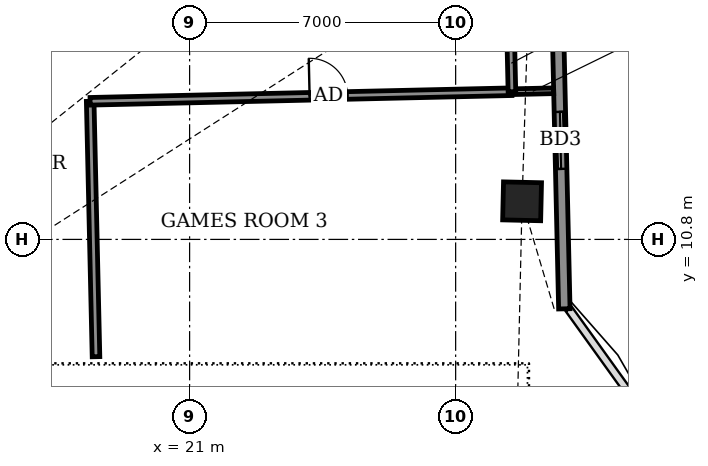
"""IFC4 building model, lengths in metres.
Left out: names, types, materials, properties, quantities, classifications, styles, units other than length and angle.
Written with IfcOpenShell. Run it as: python <this file> out.ifc"""

import sys

from ifc_helpers import new_model, si_unit, direction, frame, frame_2d, origin, origin_2d, place, context, subcontext, project, spatial, rectangle, extrude, element, fill, save


model = new_model("IFC4")
c1 = context("Model", 3, precision=1e-05, world=origin(), true_north=direction((0.0, 1.0)))
c2 = subcontext(c1, "Body", "Model", "MODEL_VIEW")
j1 = project(units=[si_unit("LENGTHUNIT", "METRE"), si_unit("PLANEANGLEUNIT", "RADIAN")], contexts=[c1])
p1 = place(None, origin())
s1 = spatial("IfcSite", under=j1, at=p1, CompositionType="ELEMENT")
p2 = place(p1, origin())
s2 = spatial("IfcBuilding", under=s1, at=p2, CompositionType="ELEMENT")
p3 = place(p2, frame((0.0, 0.0, 275.3)))
s3 = spatial("IfcBuildingStorey", under=s2, at=p3, CompositionType="ELEMENT", Elevation=275.3)
p4 = place(p3, frame((29.748, 11.802, -0.55), z_axis=(0.0, 0.0, 1.0), x_axis=(0.0226694311, 0.999743015426, 0.0)))
e1 = element("IfcColumn", 1, at=p4, inside=s3, PredefinedType="COLUMN", context=c2, shape_type="SweptSolid", body=[
    extrude(rectangle(XDim=1.0, YDim=1.0, at=origin_2d()), origin(), (0.0, 0.0, 1.0), 4.6),
])
p5 = place(p3, frame((30.86, 8.973, 0.0), z_axis=(0.0, 0.0, 1.0), x_axis=(-0.022743742485, 0.999741327633, 0.0)))
e2 = element("IfcWall", 2, at=p5, inside=s3, PredefinedType="SOLIDWALL", context=c2, shape_type="SweptSolid", body=[
    extrude(rectangle(XDim=15.393, YDim=0.3, at=frame_2d((7.697, 0.0))), origin(), (0.0, 0.0, 1.0), 2.35),
])
p6 = place(p5, frame((3.684, 0.0, 0.0)))
e3 = element("IfcOpeningElement", 3, at=p6, cuts=e2, PredefinedType="OPENING", context=c2, shape_type="SweptSolid", body=[
    extrude(rectangle(XDim=1.5, YDim=2.0, at=frame_2d((0.75, 1.0))), frame((0.0, 0.16, 0.0), z_axis=(0.0, -1.0, 0.0), x_axis=(1.0, 0.0, 0.0)), (0.0, 0.0, 1.0), 0.32),
])
p7 = place(p5, frame((12.313, 0.0, 0.5)))
e4 = element("IfcOpeningElement", 4, at=p7, cuts=e2, PredefinedType="OPENING", context=c2, shape_type="SweptSolid", body=[
    extrude(rectangle(XDim=1.2, YDim=1.1, at=frame_2d((0.6, 0.55))), frame((0.0, 0.16, 0.0), z_axis=(0.0, -1.0, 0.0), x_axis=(1.0, 0.0, 0.0)), (0.0, 0.0, 1.0), 0.32),
])
p8 = place(p3, frame((18.537, 7.714, 0.0), z_axis=(0.0, 0.0, 1.0), x_axis=(-0.022773383809, 0.999740652864, 0.0)))
e5 = element("IfcWall", 5, at=p8, inside=s3, PredefinedType="PARTITIONING", context=c2, shape_type="SweptSolid", body=[
    extrude(rectangle(XDim=6.722, YDim=0.2, at=frame_2d((3.361, 0.0))), origin(), (0.0, 0.0, 1.0), 2.35),
])
p9 = place(p3, frame((18.382, 14.434, 0.0), z_axis=(0.0, 0.0, 1.0), x_axis=(0.999742346277, 0.022698921993, 0.0)))
e6 = element("IfcWall", 6, at=p9, inside=s3, PredefinedType="PARTITIONING", context=c2, shape_type="SweptSolid", body=[
    extrude(rectangle(XDim=11.1, YDim=0.2, at=frame_2d((5.55, 0.0))), origin(), (0.0, 0.0, 1.0), 2.35),
])
p10 = place(p9, frame((5.777, 0.0, 0.0)))
e7 = element("IfcOpeningElement", 7, at=p10, cuts=e6, PredefinedType="OPENING", context=c2, shape_type="SweptSolid", body=[
    extrude(rectangle(XDim=1.0, YDim=2.1, at=frame_2d((0.5, 1.05))), frame((0.0, 0.11, 0.0), z_axis=(0.0, -1.0, 0.0), x_axis=(1.0, 0.0, 0.0)), (0.0, 0.0, 1.0), 0.22),
])
p11 = place(p3, frame((29.479, 14.686, 0.0), z_axis=(0.0, 0.0, 1.0), x_axis=(0.9997438932, 0.022630687329, 0.0)))
e8 = element("IfcWall", 8, at=p11, inside=s3, PredefinedType="PARTITIONING", context=c2, shape_type="SweptSolid", body=[
    extrude(rectangle(XDim=1.1, YDim=0.15, at=frame_2d((0.55, 0.0))), origin(), (0.0, 0.0, 1.0), 2.35),
])
p12 = place(p3, frame((29.481, 14.686, 0.0), z_axis=(0.0, 0.0, 1.0), x_axis=(-0.022617910375, 0.999744182344, 0.0)))
e9 = element("IfcWall", 9, at=p12, inside=s3, PredefinedType="PARTITIONING", context=c2, shape_type="SweptSolid", body=[
    extrude(rectangle(XDim=1.5, YDim=0.2, at=frame_2d((0.75, 0.0))), origin(), (0.0, 0.0, 1.0), 2.35),
])
p13 = place(p3, frame((-24.566, 14.96, 0.0), z_axis=(0.0, 0.0, 1.0), x_axis=(0.999742854064, 0.022676546211, 0.0)))
e10 = element("IfcWall", 10, at=p13, inside=s3, PredefinedType="PARTITIONING", context=c2, shape_type="SweptSolid", body=[
    extrude(rectangle(XDim=54.025, YDim=0.2, at=frame_2d((27.012, 0.0))), origin(), (0.0, 0.0, 1.0), 2.35),
])
p14 = place(p13, frame((51.031, 0.0, 0.0)))
e11 = element("IfcOpeningElement", 11, at=p14, cuts=e10, PredefinedType="OPENING", context=c2, shape_type="SweptSolid", body=[
    extrude(rectangle(XDim=1.0, YDim=2.1, at=frame_2d((0.5, 1.05))), frame((0.0, 0.11, 0.0), z_axis=(0.0, -1.0, 0.0), x_axis=(1.0, 0.0, 0.0)), (0.0, 0.0, 1.0), 0.22),
])
p15 = place(p13, frame((46.164, 0.0, 0.0)))
e12 = element("IfcOpeningElement", 12, at=p15, cuts=e10, PredefinedType="OPENING", context=c2, shape_type="SweptSolid", body=[
    extrude(rectangle(XDim=1.0, YDim=2.1, at=frame_2d((0.5, 1.05))), frame((0.0, 0.11, 0.0), z_axis=(0.0, -1.0, 0.0), x_axis=(1.0, 0.0, 0.0)), (0.0, 0.0, 1.0), 0.22),
])
p16 = place(p13, frame((41.639, 0.0, 0.0)))
e13 = element("IfcOpeningElement", 13, at=p16, cuts=e10, PredefinedType="OPENING", context=c2, shape_type="SweptSolid", body=[
    extrude(rectangle(XDim=1.0, YDim=2.1, at=frame_2d((0.5, 1.05))), frame((0.0, 0.11, 0.0), z_axis=(0.0, -1.0, 0.0), x_axis=(1.0, 0.0, 0.0)), (0.0, 0.0, 1.0), 0.22),
])
p17 = place(p13, frame((37.389, 0.0, 0.0)))
e14 = element("IfcOpeningElement", 14, at=p17, cuts=e10, PredefinedType="OPENING", context=c2, shape_type="SweptSolid", body=[
    extrude(rectangle(XDim=0.9, YDim=2.1, at=frame_2d((0.45, 1.05))), frame((0.0, 0.11, 0.0), z_axis=(0.0, -1.0, 0.0), x_axis=(1.0, 0.0, 0.0)), (0.0, 0.0, 1.0), 0.22),
])
p18 = place(p13, frame((29.989, 0.0, 0.0)))
e15 = element("IfcOpeningElement", 15, at=p18, cuts=e10, PredefinedType="OPENING", context=c2, shape_type="SweptSolid", body=[
    extrude(rectangle(XDim=0.9, YDim=2.1, at=frame_2d((0.45, 1.05))), frame((0.0, 0.11, 0.0), z_axis=(0.0, -1.0, 0.0), x_axis=(1.0, 0.0, 0.0)), (0.0, 0.0, 1.0), 0.22),
])
p19 = place(p13, frame((27.364, 0.0, 0.0)))
e16 = element("IfcOpeningElement", 16, at=p19, cuts=e10, PredefinedType="OPENING", context=c2, shape_type="SweptSolid", body=[
    extrude(rectangle(XDim=0.9, YDim=2.1, at=frame_2d((0.45, 1.05))), frame((0.0, 0.11, 0.0), z_axis=(0.0, -1.0, 0.0), x_axis=(1.0, 0.0, 0.0)), (0.0, 0.0, 1.0), 0.22),
])
p20 = place(p13, frame((18.139, 0.0, 0.0)))
e17 = element("IfcOpeningElement", 17, at=p20, cuts=e10, PredefinedType="OPENING", context=c2, shape_type="SweptSolid", body=[
    extrude(rectangle(XDim=1.0, YDim=2.1, at=frame_2d((0.5, 1.05))), frame((0.0, 0.11, 0.0), z_axis=(0.0, -1.0, 0.0), x_axis=(1.0, 0.0, 0.0)), (0.0, 0.0, 1.0), 0.22),
])
p21 = place(p13, frame((22.439, 0.0, 0.0)))
e18 = element("IfcOpeningElement", 18, at=p21, cuts=e10, PredefinedType="OPENING", context=c2, shape_type="SweptSolid", body=[
    extrude(rectangle(XDim=0.9, YDim=2.1, at=frame_2d((0.45, 1.05))), frame((0.0, 0.11, 0.0), z_axis=(0.0, -1.0, 0.0), x_axis=(1.0, 0.0, 0.0)), (0.0, 0.0, 1.0), 0.22),
])
p22 = place(p13, frame((12.089, 0.0, 0.0)))
e19 = element("IfcOpeningElement", 19, at=p22, cuts=e10, PredefinedType="OPENING", context=c2, shape_type="SweptSolid", body=[
    extrude(rectangle(XDim=1.0, YDim=2.1, at=frame_2d((0.5, 1.05))), frame((0.0, 0.11, 0.0), z_axis=(0.0, -1.0, 0.0), x_axis=(1.0, 0.0, 0.0)), (0.0, 0.0, 1.0), 0.22),
])
p23 = place(p13, frame((2.918, 0.0, 0.0)))
e20 = element("IfcOpeningElement", 20, at=p23, cuts=e10, PredefinedType="OPENING", context=c2, shape_type="SweptSolid", body=[
    extrude(rectangle(XDim=1.0, YDim=2.1, at=frame_2d((0.5, 1.05))), frame((0.0, 0.11, 0.0), z_axis=(0.0, -1.0, 0.0), x_axis=(1.0, 0.0, 0.0)), (0.0, 0.0, 1.0), 0.22),
])
p24 = place(p6, origin())
e21 = element("IfcDoor", 21, at=p24, inside=s3, OperationType="SLIDING_TO_LEFT", PredefinedType="DOOR", context=c2, shape_type="SweptSolid", body=[
    extrude(rectangle(XDim=1.5, YDim=2.0, at=frame_2d((0.75, 1.0))), frame((0.0, 0.025, 0.0), z_axis=(0.0, -1.0, 0.0), x_axis=(1.0, 0.0, 0.0)), (0.0, 0.0, 1.0), 0.05),
])
fill(e3, e21)
p25 = place(p10, origin())
e22 = element("IfcDoor", 22, at=p25, inside=s3, OperationType="SINGLE_SWING_LEFT", PredefinedType="DOOR", context=c2, shape_type="SweptSolid", body=[
    extrude(rectangle(XDim=1.0, YDim=2.1, at=frame_2d((0.5, 1.05))), frame((0.0, 0.025, 0.0), z_axis=(0.0, -1.0, 0.0), x_axis=(1.0, 0.0, 0.0)), (0.0, 0.0, 1.0), 0.05),
])
fill(e7, e22)
save(model, sys.argv[1])
